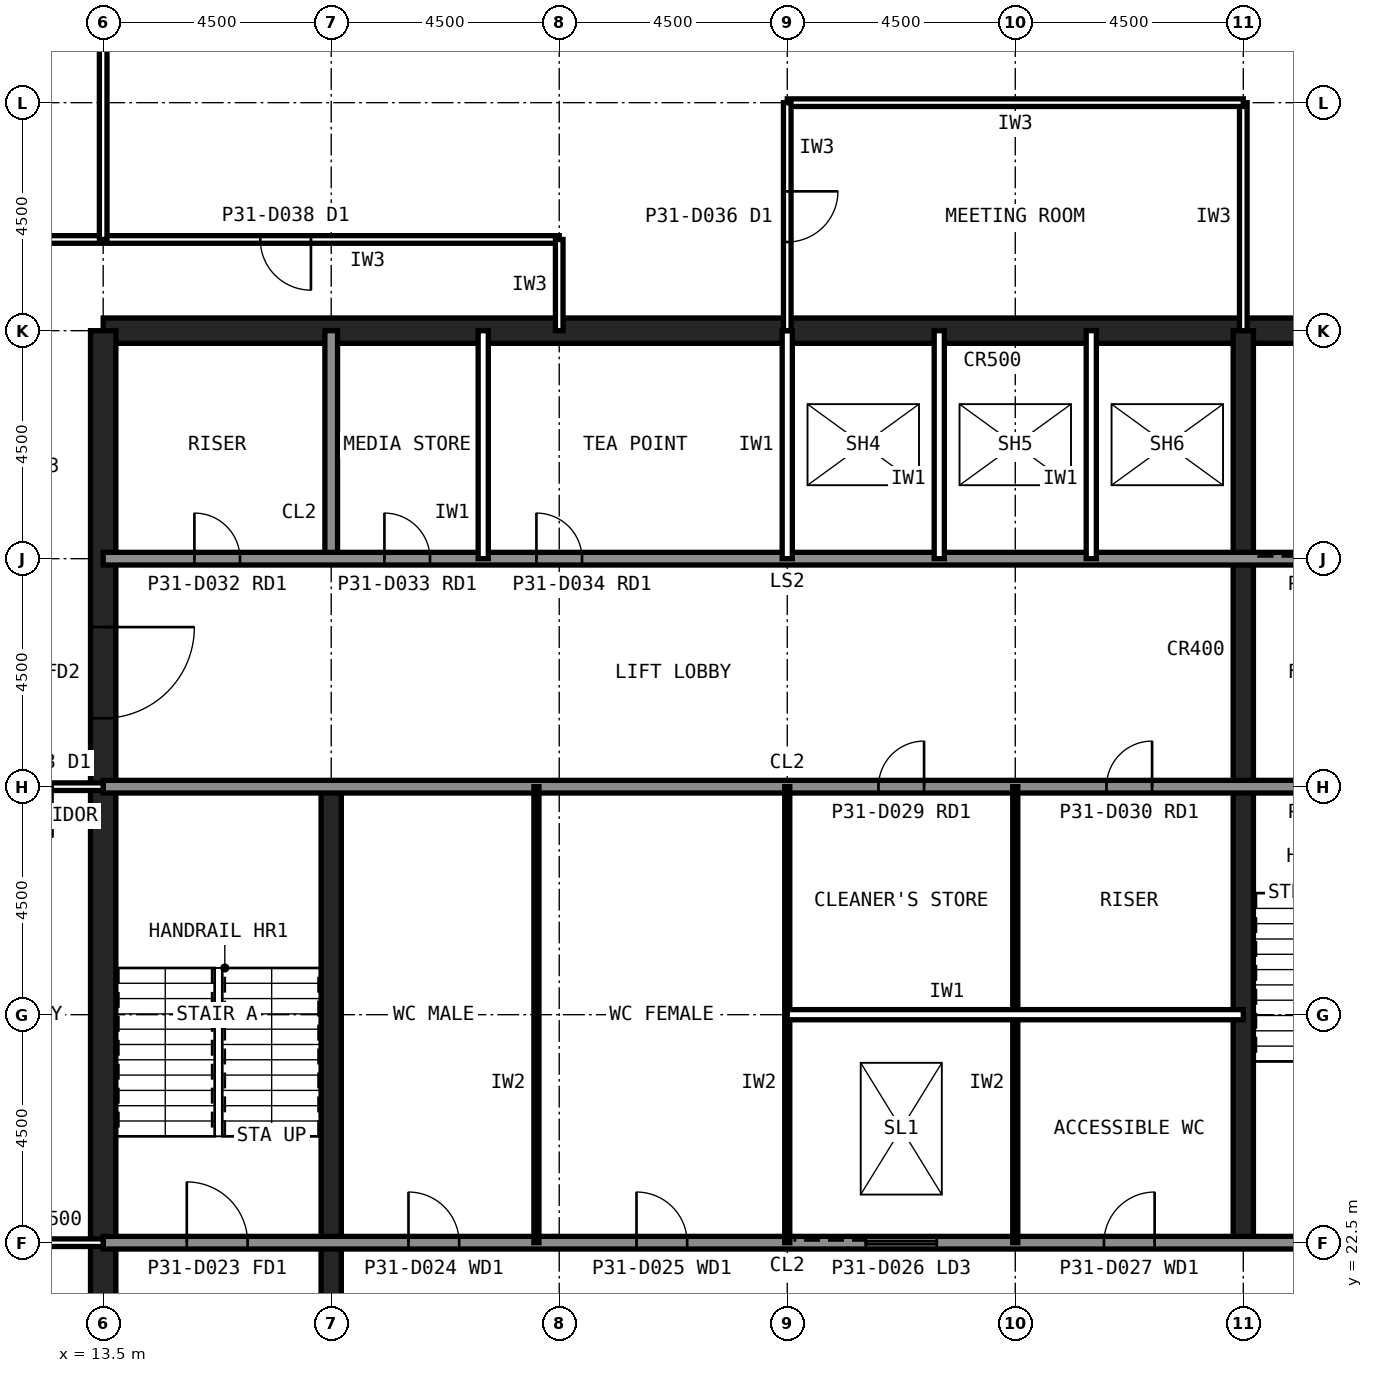
"""IFC4 building model, lengths in metres.
Left out: names, types, materials, properties, quantities, classifications, styles, units other than length and angle.
Written with IfcOpenShell. Run it as: python <this file> out.ifc"""

import sys

from ifc_helpers import new_model, si_unit, direction, frame, frame_2d, origin, place, context, subcontext, project, spatial, rectangle, extrude, element, fill, save


model = new_model("IFC4")
c1 = context("Model", 3, precision=1e-05, world=origin(), true_north=direction((0.0, 1.0)))
c2 = subcontext(c1, "Body", "Model", "MODEL_VIEW")
j1 = project(units=[si_unit("LENGTHUNIT", "METRE"), si_unit("PLANEANGLEUNIT", "RADIAN")], contexts=[c1])
p1 = place(None, origin())
s1 = spatial("IfcSite", under=j1, at=p1, CompositionType="ELEMENT")
p2 = place(p1, origin())
s2 = spatial("IfcBuilding", under=s1, at=p2, CompositionType="ELEMENT")
p3 = place(p2, frame((0.0, 0.0, 135.6)))
s3 = spatial("IfcBuildingStorey", under=s2, at=p3, CompositionType="ELEMENT", Elevation=135.6)
p4 = place(p3, frame((40.5, 40.5, 0.0), z_axis=(0.0, 0.0, 1.0), x_axis=(-1.0, 0.0, 0.0)))
e1 = element("IfcWall", 1, at=p4, inside=s3, PredefinedType="SHEAR", context=c2, shape_type="SweptSolid", body=[
    extrude(rectangle(XDim=27.0, YDim=0.5, at=frame_2d((13.5, 0.0))), origin(), (0.0, 0.0, 1.0), 4.0),
])
p5 = place(p3, frame((13.5, 40.5, 0.0), z_axis=(0.0, 0.0, 1.0), x_axis=(0.0, -1.0, 0.0)))
e2 = element("IfcWall", 2, at=p5, inside=s3, PredefinedType="SHEAR", context=c2, shape_type="SweptSolid", body=[
    extrude(rectangle(XDim=27.0, YDim=0.5, at=frame_2d((13.5, 0.0))), origin(), (0.0, 0.0, 1.0), 4.0),
])
p6 = place(p5, frame((19.65, 0.0, 0.0)))
e3 = element("IfcOpeningElement", 3, at=p6, cuts=e2, PredefinedType="OPENING", context=c2, shape_type="SweptSolid", body=[
    extrude(rectangle(XDim=1.2, YDim=2.1, at=frame_2d((0.6, 1.05))), frame((0.0, 0.26, 0.0), z_axis=(0.0, -1.0, 0.0), x_axis=(1.0, 0.0, 0.0)), (0.0, 0.0, 1.0), 0.52),
])
p7 = place(p5, frame((5.85, 0.0, 0.0)))
e4 = element("IfcOpeningElement", 4, at=p7, cuts=e2, PredefinedType="OPENING", context=c2, shape_type="SweptSolid", body=[
    extrude(rectangle(XDim=1.8, YDim=2.1, at=frame_2d((0.9, 1.05))), frame((0.0, 0.26, 0.0), z_axis=(0.0, -1.0, 0.0), x_axis=(1.0, 0.0, 0.0)), (0.0, 0.0, 1.0), 0.52),
])
p8 = place(p3, frame((18.0, 13.5, 0.0), z_axis=(0.0, 0.0, 1.0), x_axis=(0.0, 1.0, 0.0)))
e5 = element("IfcWall", 5, at=p8, inside=s3, PredefinedType="SHEAR", context=c2, shape_type="SweptSolid", body=[
    extrude(rectangle(XDim=18.0, YDim=0.4, at=frame_2d((9.0, 0.0))), origin(), (0.0, 0.0, 1.0), 4.0),
])
p9 = place(p3, frame((18.0, 36.0, 0.0), z_axis=(0.0, 0.0, 1.0), x_axis=(0.0, 1.0, 0.0)))
e6 = element("IfcWall", 6, at=p9, inside=s3, PredefinedType="SOLIDWALL", context=c2, shape_type="SweptSolid", body=[
    extrude(rectangle(XDim=4.5, YDim=0.25, at=frame_2d((2.25, 0.0))), origin(), (0.0, 0.0, 1.0), 3.84),
])
p10 = place(p3, frame((36.0, 22.5, 0.0), z_axis=(0.0, 0.0, 1.0), x_axis=(0.0, 1.0, 0.0)))
e7 = element("IfcWall", 7, at=p10, inside=s3, PredefinedType="SHEAR", context=c2, shape_type="SweptSolid", body=[
    extrude(rectangle(XDim=18.0, YDim=0.4, at=frame_2d((9.0, 0.0))), origin(), (0.0, 0.0, 1.0), 4.0),
])
p11 = place(p3, frame((13.5, 36.0, 0.0), z_axis=(0.0, 0.0, 1.0), x_axis=(1.0, 0.0, 0.0)))
e8 = element("IfcWall", 8, at=p11, inside=s3, PredefinedType="SOLIDWALL", context=c2, shape_type="SweptSolid", body=[
    extrude(rectangle(XDim=27.0, YDim=0.25, at=frame_2d((13.5, 0.0))), origin(), (0.0, 0.0, 1.0), 3.84),
])
p12 = place(p11, frame((1.8, 0.0, 0.0)))
e9 = element("IfcOpeningElement", 9, at=p12, cuts=e8, PredefinedType="OPENING", context=c2, shape_type="SweptSolid", body=[
    extrude(rectangle(XDim=0.9, YDim=2.1, at=frame_2d((0.45, 1.05))), frame((0.0, 0.135, 0.0), z_axis=(0.0, -1.0, 0.0), x_axis=(1.0, 0.0, 0.0)), (0.0, 0.0, 1.0), 0.27),
])
p13 = place(p11, frame((5.55, 0.0, 0.0)))
e10 = element("IfcOpeningElement", 10, at=p13, cuts=e8, PredefinedType="OPENING", context=c2, shape_type="SweptSolid", body=[
    extrude(rectangle(XDim=0.9, YDim=2.1, at=frame_2d((0.45, 1.05))), frame((0.0, 0.135, 0.0), z_axis=(0.0, -1.0, 0.0), x_axis=(1.0, 0.0, 0.0)), (0.0, 0.0, 1.0), 0.27),
])
p14 = place(p11, frame((8.55, 0.0, 0.0)))
e11 = element("IfcOpeningElement", 11, at=p14, cuts=e8, PredefinedType="OPENING", context=c2, shape_type="SweptSolid", body=[
    extrude(rectangle(XDim=0.9, YDim=2.1, at=frame_2d((0.45, 1.05))), frame((0.0, 0.135, 0.0), z_axis=(0.0, -1.0, 0.0), x_axis=(1.0, 0.0, 0.0)), (0.0, 0.0, 1.0), 0.27),
])
p15 = place(p11, frame((24.1, 0.0, 0.0)))
e12 = element("IfcOpeningElement", 12, at=p15, cuts=e8, PredefinedType="OPENING", context=c2, shape_type="SweptSolid", body=[
    extrude(rectangle(XDim=1.3, YDim=2.2, at=frame_2d((0.65, 1.1))), frame((0.0, 0.135, 0.0), z_axis=(0.0, -1.0, 0.0), x_axis=(1.0, 0.0, 0.0)), (0.0, 0.0, 1.0), 0.27),
])
p16 = place(p3, frame((13.5, 22.5, 0.0), z_axis=(0.0, 0.0, 1.0), x_axis=(1.0, 0.0, 0.0)))
e13 = element("IfcWall", 13, at=p16, inside=s3, PredefinedType="SOLIDWALL", context=c2, shape_type="SweptSolid", body=[
    extrude(rectangle(XDim=27.0, YDim=0.25, at=frame_2d((13.5, 0.0))), origin(), (0.0, 0.0, 1.0), 3.84),
])
p17 = place(p16, frame((1.65, 0.0, 0.0)))
e14 = element("IfcOpeningElement", 14, at=p17, cuts=e13, PredefinedType="OPENING", context=c2, shape_type="SweptSolid", body=[
    extrude(rectangle(XDim=1.2, YDim=2.1, at=frame_2d((0.6, 1.05))), frame((0.0, 0.135, 0.0), z_axis=(0.0, -1.0, 0.0), x_axis=(1.0, 0.0, 0.0)), (0.0, 0.0, 1.0), 0.27),
])
p18 = place(p16, frame((6.025, 0.0, 0.0)))
e15 = element("IfcOpeningElement", 15, at=p18, cuts=e13, PredefinedType="OPENING", context=c2, shape_type="SweptSolid", body=[
    extrude(rectangle(XDim=1.0, YDim=2.1, at=frame_2d((0.5, 1.05))), frame((0.0, 0.135, 0.0), z_axis=(0.0, -1.0, 0.0), x_axis=(1.0, 0.0, 0.0)), (0.0, 0.0, 1.0), 0.27),
])
p19 = place(p16, frame((10.525, 0.0, 0.0)))
e16 = element("IfcOpeningElement", 16, at=p19, cuts=e13, PredefinedType="OPENING", context=c2, shape_type="SweptSolid", body=[
    extrude(rectangle(XDim=1.0, YDim=2.1, at=frame_2d((0.5, 1.05))), frame((0.0, 0.135, 0.0), z_axis=(0.0, -1.0, 0.0), x_axis=(1.0, 0.0, 0.0)), (0.0, 0.0, 1.0), 0.27),
])
p20 = place(p16, frame((19.75, 0.0, 0.0)))
e17 = element("IfcOpeningElement", 17, at=p20, cuts=e13, PredefinedType="OPENING", context=c2, shape_type="SweptSolid", body=[
    extrude(rectangle(XDim=1.0, YDim=2.1, at=frame_2d((0.5, 1.05))), frame((0.0, 0.135, 0.0), z_axis=(0.0, -1.0, 0.0), x_axis=(1.0, 0.0, 0.0)), (0.0, 0.0, 1.0), 0.27),
])
p21 = place(p16, frame((15.05, 0.0, 0.0)))
e18 = element("IfcOpeningElement", 18, at=p21, cuts=e13, PredefinedType="OPENING", context=c2, shape_type="SweptSolid", body=[
    extrude(rectangle(XDim=1.4, YDim=2.4, at=frame_2d((0.7, 1.2))), frame((0.0, 0.135, 0.0), z_axis=(0.0, -1.0, 0.0), x_axis=(1.0, 0.0, 0.0)), (0.0, 0.0, 1.0), 0.27),
])
p22 = place(p3, frame((13.5, 31.5, 0.0), z_axis=(0.0, 0.0, 1.0), x_axis=(1.0, 0.0, 0.0)))
e19 = element("IfcWall", 19, at=p22, inside=s3, PredefinedType="SOLIDWALL", context=c2, shape_type="SweptSolid", body=[
    extrude(rectangle(XDim=27.0, YDim=0.25, at=frame_2d((13.5, 0.0))), origin(), (0.0, 0.0, 1.0), 3.84),
])
p23 = place(p22, frame((24.15, 0.0, 0.0)))
e20 = element("IfcOpeningElement", 20, at=p23, cuts=e19, PredefinedType="OPENING", context=c2, shape_type="SweptSolid", body=[
    extrude(rectangle(XDim=1.2, YDim=2.1, at=frame_2d((0.6, 1.05))), frame((0.0, 0.135, 0.0), z_axis=(0.0, -1.0, 0.0), x_axis=(1.0, 0.0, 0.0)), (0.0, 0.0, 1.0), 0.27),
])
p24 = place(p22, frame((15.3, 0.0, 0.0)))
e21 = element("IfcOpeningElement", 21, at=p24, cuts=e19, PredefinedType="OPENING", context=c2, shape_type="SweptSolid", body=[
    extrude(rectangle(XDim=0.9, YDim=2.1, at=frame_2d((0.45, 1.05))), frame((0.0, 0.135, 0.0), z_axis=(0.0, -1.0, 0.0), x_axis=(1.0, 0.0, 0.0)), (0.0, 0.0, 1.0), 0.27),
])
p25 = place(p22, frame((19.8, 0.0, 0.0)))
e22 = element("IfcOpeningElement", 22, at=p25, cuts=e19, PredefinedType="OPENING", context=c2, shape_type="SweptSolid", body=[
    extrude(rectangle(XDim=0.9, YDim=2.1, at=frame_2d((0.45, 1.05))), frame((0.0, 0.135, 0.0), z_axis=(0.0, -1.0, 0.0), x_axis=(1.0, 0.0, 0.0)), (0.0, 0.0, 1.0), 0.27),
])
for number, where, z_axis, x_axis in (
    (23, (21.0, 36.0, 0.0), (0.0, 0.0, 1.0), (0.0, 1.0, 0.0)),
    (24, (27.0, 36.0, 0.0), (0.0, 0.0, 1.0), (0.0, 1.0, 0.0)),
    (25, (30.0, 36.0, 0.0), (0.0, 0.0, 1.0), (0.0, 1.0, 0.0)),
    (26, (33.0, 36.0, 0.0), (0.0, 0.0, 1.0), (0.0, 1.0, 0.0)),
):
    element("IfcWall", number, at=place(p3, frame(where, z_axis=z_axis, x_axis=x_axis)), inside=s3, PredefinedType="PARTITIONING", context=c2, shape_type="SweptSolid", body=[
        extrude(rectangle(XDim=4.5, YDim=0.2, at=frame_2d((2.25, 0.0))), origin(), (0.0, 0.0, 1.0), 3.84),
    ])
for number, where, z_axis, x_axis in (
    (27, (22.05, 22.5, 0.0), (0.0, 0.0, 1.0), (0.0, 1.0, 0.0)),
    (28, (27.0, 22.5, 0.0), (0.0, 0.0, 1.0), (0.0, 1.0, 0.0)),
    (29, (31.5, 22.5, 0.0), (0.0, 0.0, 1.0), (0.0, 1.0, 0.0)),
):
    element("IfcWall", number, at=place(p3, frame(where, z_axis=z_axis, x_axis=x_axis)), inside=s3, PredefinedType="PLUMBINGWALL", context=c2, shape_type="SweptSolid", body=[
        extrude(rectangle(XDim=9.0, YDim=0.1, at=frame_2d((4.5, 0.0))), origin(), (0.0, 0.0, 1.0), 3.84),
    ])
p26 = place(p3, frame((27.0, 27.0, 0.0), z_axis=(0.0, 0.0, 1.0), x_axis=(1.0, 0.0, 0.0)))
e30 = element("IfcWall", 30, at=p26, inside=s3, PredefinedType="PARTITIONING", context=c2, shape_type="SweptSolid", body=[
    extrude(rectangle(XDim=9.0, YDim=0.2, at=frame_2d((4.5, 0.0))), origin(), (0.0, 0.0, 1.0), 3.84),
])
p27 = place(p3, frame((22.5, 42.3, 0.0), z_axis=(0.0, 0.0, 1.0), x_axis=(-1.0, 0.0, 0.0)))
e31 = element("IfcWall", 31, at=p27, inside=s3, PredefinedType="PARTITIONING", context=c2, shape_type="SweptSolid", body=[
    extrude(rectangle(XDim=10.8, YDim=0.15, at=frame_2d((5.4, 0.0))), origin(), (0.0, 0.0, 1.0), 3.84),
])
p28 = place(p27, frame((4.9, 0.0, 0.0)))
e32 = element("IfcOpeningElement", 32, at=p28, cuts=e31, PredefinedType="OPENING", context=c2, shape_type="SweptSolid", body=[
    extrude(rectangle(XDim=1.0, YDim=2.1, at=frame_2d((0.5, 1.05))), frame((0.0, 0.085, 0.0), z_axis=(0.0, -1.0, 0.0), x_axis=(1.0, 0.0, 0.0)), (0.0, 0.0, 1.0), 0.17),
])
p29 = place(p3, frame((22.5, 40.5, 0.0), z_axis=(0.0, 0.0, 1.0), x_axis=(0.0, 1.0, 0.0)))
e33 = element("IfcWall", 33, at=p29, inside=s3, PredefinedType="PARTITIONING", context=c2, shape_type="SweptSolid", body=[
    extrude(rectangle(XDim=1.8, YDim=0.15, at=frame_2d((0.9, 0.0))), origin(), (0.0, 0.0, 1.0), 2.989),
])
p30 = place(p3, frame((36.0, 40.5, 0.0), z_axis=(0.0, 0.0, 1.0), x_axis=(0.0, 1.0, 0.0)))
e34 = element("IfcWall", 34, at=p30, inside=s3, PredefinedType="PARTITIONING", context=c2, shape_type="SweptSolid", body=[
    extrude(rectangle(XDim=4.5, YDim=0.15, at=frame_2d((2.25, 0.0))), origin(), (0.0, 0.0, 1.0), 2.989),
])
p31 = place(p3, frame((36.0, 45.0, 0.0), z_axis=(0.0, 0.0, 1.0), x_axis=(-1.0, 0.0, 0.0)))
e35 = element("IfcWall", 35, at=p31, inside=s3, PredefinedType="PARTITIONING", context=c2, shape_type="SweptSolid", body=[
    extrude(rectangle(XDim=9.0, YDim=0.15, at=frame_2d((4.5, 0.0))), origin(), (0.0, 0.0, 1.0), 3.84),
])
p32 = place(p3, frame((27.0, 45.0, 0.0), z_axis=(0.0, 0.0, 1.0), x_axis=(0.0, -1.0, 0.0)))
e36 = element("IfcWall", 36, at=p32, inside=s3, PredefinedType="PARTITIONING", context=c2, shape_type="SweptSolid", body=[
    extrude(rectangle(XDim=4.5, YDim=0.15, at=frame_2d((2.25, 0.0))), origin(), (0.0, 0.0, 1.0), 2.989),
])
p33 = place(p32, frame((1.75, 0.0, 0.0)))
e37 = element("IfcOpeningElement", 37, at=p33, cuts=e36, PredefinedType="OPENING", context=c2, shape_type="SweptSolid", body=[
    extrude(rectangle(XDim=1.0, YDim=2.1, at=frame_2d((0.5, 1.05))), frame((0.0, 0.085, 0.0), z_axis=(0.0, -1.0, 0.0), x_axis=(1.0, 0.0, 0.0)), (0.0, 0.0, 1.0), 0.17),
])
p34 = place(p3, frame((10.5, 22.5, 0.0), z_axis=(0.0, 0.0, 1.0), x_axis=(1.0, 0.0, 0.0)))
e38 = element("IfcWall", 38, at=p34, inside=s3, PredefinedType="PARTITIONING", context=c2, shape_type="SweptSolid", body=[
    extrude(rectangle(XDim=3.0, YDim=0.15, at=frame_2d((1.5, 0.0))), origin(), (0.0, 0.0, 1.0), 2.989),
])
p35 = place(p3, frame((13.5, 31.5, 0.0), z_axis=(0.0, 0.0, 1.0), x_axis=(-1.0, 0.0, 0.0)))
e39 = element("IfcWall", 39, at=p35, inside=s3, PredefinedType="PARTITIONING", context=c2, shape_type="SweptSolid", body=[
    extrude(rectangle(XDim=3.0, YDim=0.15, at=frame_2d((1.5, 0.0))), origin(), (0.0, 0.0, 1.0), 2.989),
])
p36 = place(p35, frame((1.0, 0.0, 0.0)))
e40 = element("IfcOpeningElement", 40, at=p36, cuts=e39, PredefinedType="OPENING", context=c2, shape_type="SweptSolid", body=[
    extrude(rectangle(XDim=1.0, YDim=2.1, at=frame_2d((0.5, 1.05))), frame((0.0, 0.085, 0.0), z_axis=(0.0, -1.0, 0.0), x_axis=(1.0, 0.0, 0.0)), (0.0, 0.0, 1.0), 0.17),
])
p37 = place(p3, frame((13.5, 42.3, 0.0), z_axis=(0.0, 0.0, 1.0), x_axis=(0.0, 1.0, 0.0)))
e41 = element("IfcWall", 41, at=p37, inside=s3, PredefinedType="PARTITIONING", context=c2, shape_type="SweptSolid", body=[
    extrude(rectangle(XDim=11.28, YDim=0.15, at=frame_2d((5.64, 0.0))), origin(), (0.0, 0.0, 1.0), 2.989),
])
p38 = place(p37, frame((5.14, 0.0, 0.0)))
e42 = element("IfcOpeningElement", 42, at=p38, cuts=e41, PredefinedType="OPENING", context=c2, shape_type="SweptSolid", body=[
    extrude(rectangle(XDim=1.0, YDim=2.1, at=frame_2d((0.5, 1.05))), frame((0.0, 0.085, 0.0), z_axis=(0.0, -1.0, 0.0), x_axis=(1.0, 0.0, 0.0)), (0.0, 0.0, 1.0), 0.17),
])
p39 = place(p7, origin())
e43 = element("IfcDoor", 43, at=p39, inside=s3, OperationType="SINGLE_SWING_LEFT", PredefinedType="DOOR", context=c2, shape_type="SweptSolid", body=[
    extrude(rectangle(XDim=1.8, YDim=2.1, at=frame_2d((0.9, 1.05))), frame((0.0, 0.025, 0.0), z_axis=(0.0, -1.0, 0.0), x_axis=(1.0, 0.0, 0.0)), (0.0, 0.0, 1.0), 0.05),
])
fill(e4, e43)
p40 = place(p17, origin())
e44 = element("IfcDoor", 44, at=p40, inside=s3, OperationType="SINGLE_SWING_LEFT", PredefinedType="DOOR", context=c2, shape_type="SweptSolid", body=[
    extrude(rectangle(XDim=1.2, YDim=2.1, at=frame_2d((0.6, 1.05))), frame((0.0, 0.025, 0.0), z_axis=(0.0, -1.0, 0.0), x_axis=(1.0, 0.0, 0.0)), (0.0, 0.0, 1.0), 0.05),
])
fill(e14, e44)
p41 = place(p18, origin())
e45 = element("IfcDoor", 45, at=p41, inside=s3, OperationType="SINGLE_SWING_LEFT", PredefinedType="DOOR", context=c2, shape_type="SweptSolid", body=[
    extrude(rectangle(XDim=1.0, YDim=2.1, at=frame_2d((0.5, 1.05))), frame((0.0, 0.025, 0.0), z_axis=(0.0, -1.0, 0.0), x_axis=(1.0, 0.0, 0.0)), (0.0, 0.0, 1.0), 0.05),
])
fill(e15, e45)
p42 = place(p19, origin())
e46 = element("IfcDoor", 46, at=p42, inside=s3, OperationType="SINGLE_SWING_LEFT", PredefinedType="DOOR", context=c2, shape_type="SweptSolid", body=[
    extrude(rectangle(XDim=1.0, YDim=2.1, at=frame_2d((0.5, 1.05))), frame((0.0, 0.025, 0.0), z_axis=(0.0, -1.0, 0.0), x_axis=(1.0, 0.0, 0.0)), (0.0, 0.0, 1.0), 0.05),
])
fill(e16, e46)
p43 = place(p20, origin())
e47 = element("IfcDoor", 47, at=p43, inside=s3, OperationType="SINGLE_SWING_RIGHT", PredefinedType="DOOR", context=c2, shape_type="SweptSolid", body=[
    extrude(rectangle(XDim=1.0, YDim=2.1, at=frame_2d((0.5, 1.05))), frame((0.0, 0.025, 0.0), z_axis=(0.0, -1.0, 0.0), x_axis=(1.0, 0.0, 0.0)), (0.0, 0.0, 1.0), 0.05),
])
fill(e17, e47)
p44 = place(p24, origin())
e48 = element("IfcDoor", 48, at=p44, inside=s3, OperationType="SINGLE_SWING_RIGHT", PredefinedType="DOOR", context=c2, shape_type="SweptSolid", body=[
    extrude(rectangle(XDim=0.9, YDim=2.1, at=frame_2d((0.45, 1.05))), frame((0.0, 0.025, 0.0), z_axis=(0.0, -1.0, 0.0), x_axis=(1.0, 0.0, 0.0)), (0.0, 0.0, 1.0), 0.05),
])
fill(e21, e48)
p45 = place(p25, origin())
e49 = element("IfcDoor", 49, at=p45, inside=s3, OperationType="SINGLE_SWING_RIGHT", PredefinedType="DOOR", context=c2, shape_type="SweptSolid", body=[
    extrude(rectangle(XDim=0.9, YDim=2.1, at=frame_2d((0.45, 1.05))), frame((0.0, 0.025, 0.0), z_axis=(0.0, -1.0, 0.0), x_axis=(1.0, 0.0, 0.0)), (0.0, 0.0, 1.0), 0.05),
])
fill(e22, e49)
p46 = place(p12, origin())
e50 = element("IfcDoor", 50, at=p46, inside=s3, OperationType="SINGLE_SWING_LEFT", PredefinedType="DOOR", context=c2, shape_type="SweptSolid", body=[
    extrude(rectangle(XDim=0.9, YDim=2.1, at=frame_2d((0.45, 1.05))), frame((0.0, 0.025, 0.0), z_axis=(0.0, -1.0, 0.0), x_axis=(1.0, 0.0, 0.0)), (0.0, 0.0, 1.0), 0.05),
])
fill(e9, e50)
p47 = place(p13, origin())
e51 = element("IfcDoor", 51, at=p47, inside=s3, OperationType="SINGLE_SWING_LEFT", PredefinedType="DOOR", context=c2, shape_type="SweptSolid", body=[
    extrude(rectangle(XDim=0.9, YDim=2.1, at=frame_2d((0.45, 1.05))), frame((0.0, 0.025, 0.0), z_axis=(0.0, -1.0, 0.0), x_axis=(1.0, 0.0, 0.0)), (0.0, 0.0, 1.0), 0.05),
])
fill(e10, e51)
p48 = place(p14, origin())
e52 = element("IfcDoor", 52, at=p48, inside=s3, OperationType="SINGLE_SWING_LEFT", PredefinedType="DOOR", context=c2, shape_type="SweptSolid", body=[
    extrude(rectangle(XDim=0.9, YDim=2.1, at=frame_2d((0.45, 1.05))), frame((0.0, 0.025, 0.0), z_axis=(0.0, -1.0, 0.0), x_axis=(1.0, 0.0, 0.0)), (0.0, 0.0, 1.0), 0.05),
])
fill(e11, e52)
p49 = place(p21, origin())
e53 = element("IfcDoor", 53, at=p49, inside=s3, OperationType="SLIDING_TO_LEFT", PredefinedType="DOOR", context=c2, shape_type="SweptSolid", body=[
    extrude(rectangle(XDim=1.4, YDim=2.4, at=frame_2d((0.7, 1.2))), frame((0.0, 0.025, 0.0), z_axis=(0.0, -1.0, 0.0), x_axis=(1.0, 0.0, 0.0)), (0.0, 0.0, 1.0), 0.05),
])
fill(e18, e53)
p50 = place(p28, origin())
e54 = element("IfcDoor", 54, at=p50, inside=s3, OperationType="SINGLE_SWING_LEFT", PredefinedType="DOOR", context=c2, shape_type="SweptSolid", body=[
    extrude(rectangle(XDim=1.0, YDim=2.1, at=frame_2d((0.5, 1.05))), frame((0.0, 0.025, 0.0), z_axis=(0.0, -1.0, 0.0), x_axis=(1.0, 0.0, 0.0)), (0.0, 0.0, 1.0), 0.05),
])
fill(e32, e54)
p51 = place(p33, origin())
e55 = element("IfcDoor", 55, at=p51, inside=s3, OperationType="SINGLE_SWING_LEFT", PredefinedType="DOOR", context=c2, shape_type="SweptSolid", body=[
    extrude(rectangle(XDim=1.0, YDim=2.1, at=frame_2d((0.5, 1.05))), frame((0.0, 0.025, 0.0), z_axis=(0.0, -1.0, 0.0), x_axis=(1.0, 0.0, 0.0)), (0.0, 0.0, 1.0), 0.05),
])
fill(e37, e55)
save(model, sys.argv[1])
